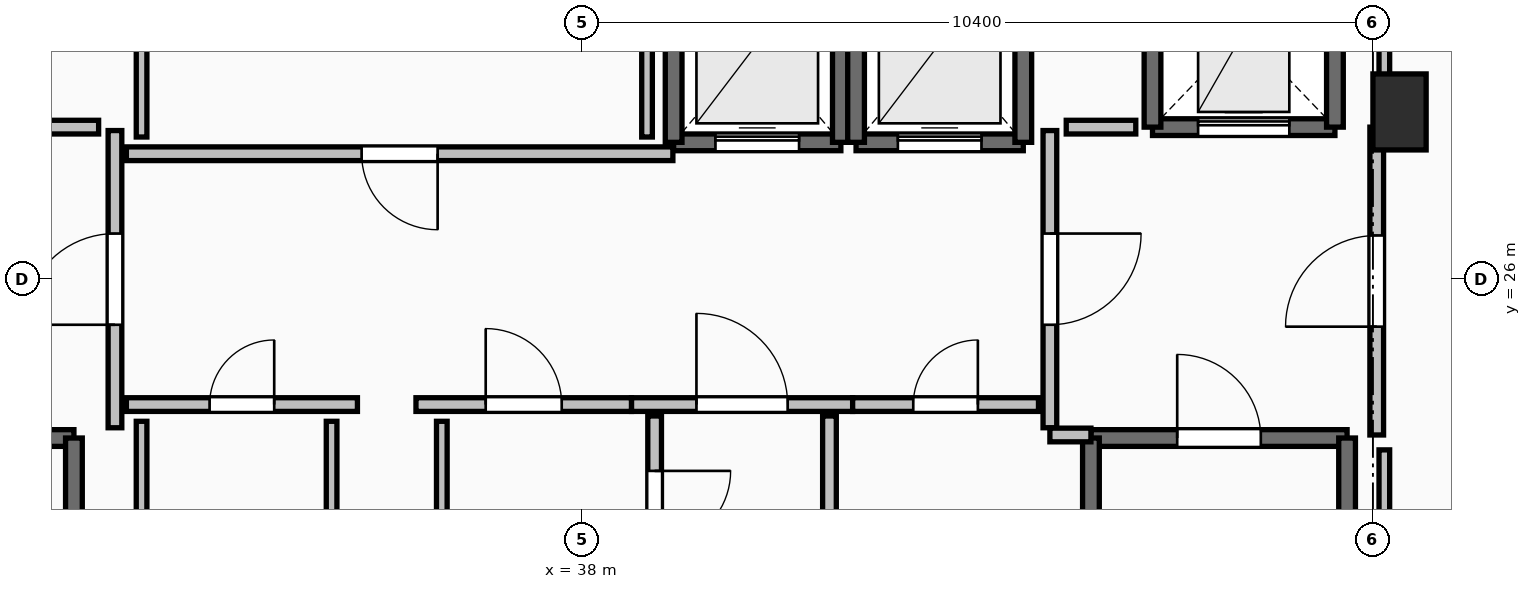
"""IFC4 building model, lengths in metres.
Left out: names, types, materials, properties, quantities, classifications, styles, units other than length and angle.
Written with IfcOpenShell. Run it as: python <this file> out.ifc"""

import sys

from ifc_helpers import new_model, si_unit, direction, frame, frame_2d, origin, origin_2d, place, context, subcontext, project, spatial, rectangle, extrude, element, fill, save


model = new_model("IFC4")
c1 = context("Model", 3, precision=1e-05, world=origin(), true_north=direction((0.0, 1.0)))
c2 = subcontext(c1, "Body", "Model", "MODEL_VIEW")
j1 = project(units=[si_unit("LENGTHUNIT", "METRE"), si_unit("PLANEANGLEUNIT", "RADIAN")], contexts=[c1])
p1 = place(None, origin())
s1 = spatial("IfcSite", under=j1, at=p1, CompositionType="ELEMENT")
p2 = place(p1, origin())
s2 = spatial("IfcBuilding", under=s1, at=p2, CompositionType="ELEMENT")
p3 = place(p2, frame((0.0, 0.0, 252.0)))
s3 = spatial("IfcBuildingStorey", under=s2, at=p3, CompositionType="ELEMENT", Elevation=252.0)
p4 = place(p3, frame((48.75, 28.2, 0.0), z_axis=(0.0, 0.0, 1.0), x_axis=(1.0, 0.0, 0.0)))
e1 = element("IfcColumn", 1, at=p4, inside=s3, PredefinedType="PILASTER", context=c2, shape_type="SweptSolid", body=[
    extrude(rectangle(XDim=0.7, YDim=1.0, at=origin_2d()), origin(), (0.0, 0.0, 1.0), 3.55),
])
p5 = place(p3, frame((27.94, 23.91, 0.0), z_axis=(0.0, 0.0, 1.0), x_axis=(1.0, 0.0, 0.0)))
e2 = element("IfcWall", 2, at=p5, inside=s3, PredefinedType="SOLIDWALL", context=c2, shape_type="SweptSolid", body=[
    extrude(rectangle(XDim=3.37, YDim=0.22, at=frame_2d((1.685, 0.0))), origin(), (0.0, 0.0, 1.0), 3.29),
])
p6 = place(p5, frame((1.135, 0.0, 0.0)))
e3 = element("IfcOpeningElement", 3, at=p6, cuts=e2, PredefinedType="OPENING", context=c2, shape_type="SweptSolid", body=[
    extrude(rectangle(XDim=1.1, YDim=2.15, at=frame_2d((0.55, 1.075))), frame((0.0, 0.125, 0.0), z_axis=(0.0, -1.0, 0.0), x_axis=(1.0, 0.0, 0.0)), (0.0, 0.0, 1.0), 0.25),
])
p7 = place(p3, frame((31.31, 23.91, 0.0), z_axis=(0.0, 0.0, 1.0), x_axis=(0.0, -1.0, 0.0)))
e4 = element("IfcWall", 4, at=p7, inside=s3, PredefinedType="SOLIDWALL", context=c2, shape_type="SweptSolid", body=[
    extrude(rectangle(XDim=7.42, YDim=0.22, at=frame_2d((3.71, 0.0))), origin(), (0.0, 0.0, 1.0), 3.29),
])
p8 = place(p3, frame((44.69, 23.91, 0.0), z_axis=(0.0, 0.0, 1.0), x_axis=(1.0, 0.0, 0.0)))
e5 = element("IfcWall", 5, at=p8, inside=s3, PredefinedType="SOLIDWALL", context=c2, shape_type="SweptSolid", body=[
    extrude(rectangle(XDim=3.37, YDim=0.22, at=frame_2d((1.685, 0.0))), origin(), (0.0, 0.0, 1.0), 3.29),
])
p9 = place(p8, frame((1.135, 0.0, 0.0)))
e6 = element("IfcOpeningElement", 6, at=p9, cuts=e5, PredefinedType="OPENING", context=c2, shape_type="SweptSolid", body=[
    extrude(rectangle(XDim=1.1, YDim=2.15, at=frame_2d((0.55, 1.075))), frame((0.0, 0.125, 0.0), z_axis=(0.0, -1.0, 0.0), x_axis=(1.0, 0.0, 0.0)), (0.0, 0.0, 1.0), 0.25),
])
for number, where, z_axis, x_axis in (
    (7, (48.06, 23.91, 0.0), (0.0, 0.0, 1.0), (0.0, -1.0, 0.0)),
    (8, (44.69, 16.49, 0.0), (0.0, 0.0, 1.0), (0.0, 1.0, 0.0)),
):
    element("IfcWall", number, at=place(p3, frame(where, z_axis=z_axis, x_axis=x_axis)), inside=s3, PredefinedType="SOLIDWALL", context=c2, shape_type="SweptSolid", body=[
        extrude(rectangle(XDim=7.42, YDim=0.22, at=frame_2d((3.71, 0.0))), origin(), (0.0, 0.0, 1.0), 3.29),
    ])
p10 = place(p3, frame((39.2, 27.8, 0.0), z_axis=(0.0, 0.0, 1.0), x_axis=(1.0, 0.0, 0.0)))
e9 = element("IfcWall", 9, at=p10, inside=s3, PredefinedType="SOLIDWALL", context=c2, shape_type="SweptSolid", body=[
    extrude(rectangle(XDim=2.2, YDim=0.22, at=frame_2d((1.1, 0.0))), origin(), (0.0, 0.0, 1.0), 3.29),
])
p11 = place(p10, frame((0.55, 0.0, 0.0)))
e10 = element("IfcOpeningElement", 10, at=p11, cuts=e9, PredefinedType="OPENING", context=c2, shape_type="SweptSolid", body=[
    extrude(rectangle(XDim=1.1, YDim=2.2, at=frame_2d((0.55, 1.1))), frame((0.0, 0.125, 0.0), z_axis=(0.0, -1.0, 0.0), x_axis=(1.0, 0.0, 0.0)), (0.0, 0.0, 1.0), 0.25),
])
for number, where, z_axis, x_axis in (
    (11, (41.4, 27.8, 0.0), (0.0, 0.0, 1.0), (0.0, 1.0, 0.0)),
    (12, (39.2, 30.4, 0.0), (0.0, 0.0, 1.0), (0.0, -1.0, 0.0)),
):
    element("IfcWall", number, at=place(p3, frame(where, z_axis=z_axis, x_axis=x_axis)), inside=s3, PredefinedType="SOLIDWALL", context=c2, shape_type="SweptSolid", body=[
        extrude(rectangle(XDim=2.6, YDim=0.22, at=frame_2d((1.3, 0.0))), origin(), (0.0, 0.0, 1.0), 3.29),
    ])
p12 = place(p3, frame((41.6, 27.8, 0.0), z_axis=(0.0, 0.0, 1.0), x_axis=(1.0, 0.0, 0.0)))
e13 = element("IfcWall", 13, at=p12, inside=s3, PredefinedType="SOLIDWALL", context=c2, shape_type="SweptSolid", body=[
    extrude(rectangle(XDim=2.2, YDim=0.22, at=frame_2d((1.1, 0.0))), origin(), (0.0, 0.0, 1.0), 3.29),
])
p13 = place(p12, frame((0.55, 0.0, 0.0)))
e14 = element("IfcOpeningElement", 14, at=p13, cuts=e13, PredefinedType="OPENING", context=c2, shape_type="SweptSolid", body=[
    extrude(rectangle(XDim=1.1, YDim=2.2, at=frame_2d((0.55, 1.1))), frame((0.0, 0.125, 0.0), z_axis=(0.0, -1.0, 0.0), x_axis=(1.0, 0.0, 0.0)), (0.0, 0.0, 1.0), 0.25),
])
for number, where, z_axis, x_axis in (
    (15, (43.8, 27.8, 0.0), (0.0, 0.0, 1.0), (0.0, 1.0, 0.0)),
    (16, (41.6, 30.4, 0.0), (0.0, 0.0, 1.0), (0.0, -1.0, 0.0)),
):
    element("IfcWall", number, at=place(p3, frame(where, z_axis=z_axis, x_axis=x_axis)), inside=s3, PredefinedType="SOLIDWALL", context=c2, shape_type="SweptSolid", body=[
        extrude(rectangle(XDim=2.6, YDim=0.22, at=frame_2d((1.3, 0.0))), origin(), (0.0, 0.0, 1.0), 3.29),
    ])
p14 = place(p3, frame((45.5, 28.0, 0.0), z_axis=(0.0, 0.0, 1.0), x_axis=(1.0, 0.0, 0.0)))
e17 = element("IfcWall", 17, at=p14, inside=s3, PredefinedType="SHEAR", context=c2, shape_type="SweptSolid", body=[
    extrude(rectangle(XDim=2.4, YDim=0.22, at=frame_2d((1.2, 0.0))), origin(), (0.0, 0.0, 1.0), 3.29),
])
p15 = place(p14, frame((0.6, 0.0, 0.0)))
e18 = element("IfcOpeningElement", 18, at=p15, cuts=e17, PredefinedType="OPENING", context=c2, shape_type="SweptSolid", body=[
    extrude(rectangle(XDim=1.2, YDim=2.2, at=frame_2d((0.6, 1.1))), frame((0.0, 0.125, 0.0), z_axis=(0.0, -1.0, 0.0), x_axis=(1.0, 0.0, 0.0)), (0.0, 0.0, 1.0), 0.25),
])
for number, where, z_axis, x_axis in (
    (19, (47.9, 28.0, 0.0), (0.0, 0.0, 1.0), (0.0, 1.0, 0.0)),
    (20, (45.5, 30.5, 0.0), (0.0, 0.0, 1.0), (0.0, -1.0, 0.0)),
):
    element("IfcWall", number, at=place(p3, frame(where, z_axis=z_axis, x_axis=x_axis)), inside=s3, PredefinedType="SHEAR", context=c2, shape_type="SweptSolid", body=[
        extrude(rectangle(XDim=2.5, YDim=0.22, at=frame_2d((1.25, 0.0))), origin(), (0.0, 0.0, 1.0), 3.29),
    ])
p16 = place(p3, frame((31.85, 24.045, 0.0), z_axis=(0.0, 0.0, 1.0), x_axis=(0.0, 1.0, 0.0)))
e21 = element("IfcWall", 21, at=p16, inside=s3, PredefinedType="PARTITIONING", context=c2, shape_type="SweptSolid", body=[
    extrude(rectangle(XDim=3.91, YDim=0.18, at=frame_2d((1.955, 0.0))), origin(), (0.0, 0.0, 1.0), 3.29),
])
p17 = place(p16, frame((1.355, 0.0, 0.0)))
e22 = element("IfcOpeningElement", 22, at=p17, cuts=e21, PredefinedType="OPENING", context=c2, shape_type="SweptSolid", body=[
    extrude(rectangle(XDim=1.2, YDim=2.15, at=frame_2d((0.6, 1.075))), frame((0.0, 0.105, 0.0), z_axis=(0.0, -1.0, 0.0), x_axis=(1.0, 0.0, 0.0)), (0.0, 0.0, 1.0), 0.21),
])
p18 = place(p3, frame((44.15, 27.955, 0.0), z_axis=(0.0, 0.0, 1.0), x_axis=(0.0, -1.0, 0.0)))
e23 = element("IfcWall", 23, at=p18, inside=s3, PredefinedType="PARTITIONING", context=c2, shape_type="SweptSolid", body=[
    extrude(rectangle(XDim=3.91, YDim=0.18, at=frame_2d((1.955, 0.0))), origin(), (0.0, 0.0, 1.0), 3.29),
])
p19 = place(p18, frame((1.355, 0.0, 0.0)))
e24 = element("IfcOpeningElement", 24, at=p19, cuts=e23, PredefinedType="OPENING", context=c2, shape_type="SweptSolid", body=[
    extrude(rectangle(XDim=1.2, YDim=2.15, at=frame_2d((0.6, 1.075))), frame((0.0, 0.105, 0.0), z_axis=(0.0, -1.0, 0.0), x_axis=(1.0, 0.0, 0.0)), (0.0, 0.0, 1.0), 0.21),
])
p20 = place(p3, frame((44.15, 23.95, 0.0), z_axis=(0.0, 0.0, 1.0), x_axis=(1.0, 0.0, 0.0)))
e25 = element("IfcWall", 25, at=p20, inside=s3, PredefinedType="PARTITIONING", context=c2, shape_type="SweptSolid", body=[
    extrude(rectangle(XDim=0.54, YDim=0.18, at=frame_2d((0.27, 0.0))), origin(), (0.0, 0.0, 1.0), 3.29),
])
p21 = place(p3, frame((48.45, 23.95, 0.0), z_axis=(0.0, 0.0, 1.0), x_axis=(0.0, 1.0, 0.0)))
e26 = element("IfcWall", 26, at=p21, inside=s3, PredefinedType="PARTITIONING", context=c2, shape_type="SweptSolid", body=[
    extrude(rectangle(XDim=4.05, YDim=0.18, at=frame_2d((2.025, 0.0))), origin(), (0.0, 0.0, 1.0), 3.29),
])
p22 = place(p21, frame((1.425, 0.0, 0.0)))
e27 = element("IfcOpeningElement", 27, at=p22, cuts=e26, PredefinedType="OPENING", context=c2, shape_type="SweptSolid", body=[
    extrude(rectangle(XDim=1.2, YDim=2.15, at=frame_2d((0.6, 1.075))), frame((0.0, 0.105, 0.0), z_axis=(0.0, -1.0, 0.0), x_axis=(1.0, 0.0, 0.0)), (0.0, 0.0, 1.0), 0.21),
])
p23 = place(p3, frame((38.645, 24.35, 0.0), z_axis=(0.0, 0.0, 1.0), x_axis=(1.0, 0.0, 0.0)))
e28 = element("IfcWall", 28, at=p23, inside=s3, PredefinedType="PARTITIONING", context=c2, shape_type="SweptSolid", body=[
    extrude(rectangle(XDim=2.91, YDim=0.18, at=frame_2d((1.455, 0.0))), origin(), (0.0, 0.0, 1.0), 3.29),
])
p24 = place(p23, frame((0.855, 0.0, 0.0)))
e29 = element("IfcOpeningElement", 29, at=p24, cuts=e28, PredefinedType="OPENING", context=c2, shape_type="SweptSolid", body=[
    extrude(rectangle(XDim=1.2, YDim=2.15, at=frame_2d((0.6, 1.075))), frame((0.0, 0.105, 0.0), z_axis=(0.0, -1.0, 0.0), x_axis=(1.0, 0.0, 0.0)), (0.0, 0.0, 1.0), 0.21),
])
p25 = place(p3, frame((41.555, 24.35, 0.0), z_axis=(0.0, 0.0, 1.0), x_axis=(1.0, 0.0, 0.0)))
e30 = element("IfcWall", 30, at=p25, inside=s3, PredefinedType="PARTITIONING", context=c2, shape_type="SweptSolid", body=[
    extrude(rectangle(XDim=2.445, YDim=0.18, at=frame_2d((1.223, 0.0))), origin(), (0.0, 0.0, 1.0), 3.29),
])
p26 = place(p25, frame((0.798, 0.0, 0.0)))
e31 = element("IfcOpeningElement", 31, at=p26, cuts=e30, PredefinedType="OPENING", context=c2, shape_type="SweptSolid", body=[
    extrude(rectangle(XDim=0.85, YDim=2.1, at=frame_2d((0.425, 1.05))), frame((0.0, 0.105, 0.0), z_axis=(0.0, -1.0, 0.0), x_axis=(1.0, 0.0, 0.0)), (0.0, 0.0, 1.0), 0.21),
])
p27 = place(p3, frame((39.19, 27.65, 0.0), z_axis=(0.0, 0.0, 1.0), x_axis=(-1.0, 0.0, 0.0)))
e32 = element("IfcWall", 32, at=p27, inside=s3, PredefinedType="PARTITIONING", context=c2, shape_type="SweptSolid", body=[
    extrude(rectangle(XDim=7.19, YDim=0.18, at=frame_2d((3.595, 0.0))), origin(), (0.0, 0.0, 1.0), 3.29),
])
p28 = place(p27, frame((3.095, 0.0, 0.0)))
e33 = element("IfcOpeningElement", 33, at=p28, cuts=e32, PredefinedType="OPENING", context=c2, shape_type="SweptSolid", body=[
    extrude(rectangle(XDim=1.0, YDim=2.15, at=frame_2d((0.5, 1.075))), frame((0.0, 0.105, 0.0), z_axis=(0.0, -1.0, 0.0), x_axis=(1.0, 0.0, 0.0)), (0.0, 0.0, 1.0), 0.21),
])
p29 = place(p3, frame((32.0, 24.35, 0.0), z_axis=(0.0, 0.0, 1.0), x_axis=(1.0, 0.0, 0.0)))
e34 = element("IfcWall", 34, at=p29, inside=s3, PredefinedType="PARTITIONING", context=c2, shape_type="SweptSolid", body=[
    extrude(rectangle(XDim=3.04, YDim=0.18, at=frame_2d((1.52, 0.0))), origin(), (0.0, 0.0, 1.0), 3.29),
])
p30 = place(p29, frame((1.095, 0.0, 0.0)))
e35 = element("IfcOpeningElement", 35, at=p30, cuts=e34, PredefinedType="OPENING", context=c2, shape_type="SweptSolid", body=[
    extrude(rectangle(XDim=0.85, YDim=2.1, at=frame_2d((0.425, 1.05))), frame((0.0, 0.105, 0.0), z_axis=(0.0, -1.0, 0.0), x_axis=(1.0, 0.0, 0.0)), (0.0, 0.0, 1.0), 0.21),
])
p31 = place(p3, frame((35.81, 24.35, 0.0), z_axis=(0.0, 0.0, 1.0), x_axis=(1.0, 0.0, 0.0)))
e36 = element("IfcWall", 36, at=p31, inside=s3, PredefinedType="PARTITIONING", context=c2, shape_type="SweptSolid", body=[
    extrude(rectangle(XDim=2.835, YDim=0.18, at=frame_2d((1.417, 0.0))), origin(), (0.0, 0.0, 1.0), 3.29),
])
p32 = place(p31, frame((0.917, 0.0, 0.0)))
e37 = element("IfcOpeningElement", 37, at=p32, cuts=e36, PredefinedType="OPENING", context=c2, shape_type="SweptSolid", body=[
    extrude(rectangle(XDim=1.0, YDim=2.15, at=frame_2d((0.5, 1.075))), frame((0.0, 0.105, 0.0), z_axis=(0.0, -1.0, 0.0), x_axis=(1.0, 0.0, 0.0)), (0.0, 0.0, 1.0), 0.21),
])
p33 = place(p3, frame((41.25, 20.305, 0.0), z_axis=(0.0, 0.0, 1.0), x_axis=(0.0, 1.0, 0.0)))
e38 = element("IfcWall", 38, at=p33, inside=s3, PredefinedType="PARTITIONING", context=c2, shape_type="SweptSolid", body=[
    extrude(rectangle(XDim=3.895, YDim=0.18, at=frame_2d((1.948, 0.0))), origin(), (0.0, 0.0, 1.0), 2.482),
])
p34 = place(p33, frame((1.522, 0.0, 0.0)))
e39 = element("IfcOpeningElement", 39, at=p34, cuts=e38, PredefinedType="OPENING", context=c2, shape_type="SweptSolid", body=[
    extrude(rectangle(XDim=0.85, YDim=2.1, at=frame_2d((0.425, 1.05))), frame((0.0, 0.105, 0.0), z_axis=(0.0, -1.0, 0.0), x_axis=(1.0, 0.0, 0.0)), (0.0, 0.0, 1.0), 0.21),
])
p35 = place(p3, frame((38.95, 24.2, 0.0), z_axis=(0.0, 0.0, 1.0), x_axis=(0.0, -1.0, 0.0)))
e40 = element("IfcWall", 40, at=p35, inside=s3, PredefinedType="PARTITIONING", context=c2, shape_type="SweptSolid", body=[
    extrude(rectangle(XDim=2.445, YDim=0.18, at=frame_2d((1.223, 0.0))), origin(), (0.0, 0.0, 1.0), 2.482),
])
p36 = place(p35, frame((0.722, 0.0, 0.0)))
e41 = element("IfcOpeningElement", 41, at=p36, cuts=e40, PredefinedType="OPENING", context=c2, shape_type="SweptSolid", body=[
    extrude(rectangle(XDim=1.0, YDim=2.15, at=frame_2d((0.5, 1.075))), frame((0.0, 0.105, 0.0), z_axis=(0.0, -1.0, 0.0), x_axis=(1.0, 0.0, 0.0)), (0.0, 0.0, 1.0), 0.21),
])
for number, where, z_axis, x_axis in (
    (42, (31.635, 28.0, 0.0), (0.0, 0.0, 1.0), (-1.0, 0.0, 0.0)),
    (43, (45.28, 28.0, 0.0), (0.0, 0.0, 1.0), (-1.0, 0.0, 0.0)),
):
    element("IfcWall", number, at=place(p3, frame(where, z_axis=z_axis, x_axis=x_axis)), inside=s3, PredefinedType="PARTITIONING", context=c2, shape_type="SweptSolid", body=[
        extrude(rectangle(XDim=0.915, YDim=0.18, at=frame_2d((0.458, 0.0))), origin(), (0.0, 0.0, 1.0), 3.29),
    ])
for number, where, z_axis, x_axis in (
    (44, (32.2, 30.26, 0.0), (0.0, 0.0, 1.0), (0.0, -1.0, 0.0)),
    (45, (38.85, 27.87, 0.0), (0.0, 0.0, 1.0), (0.0, 1.0, 0.0)),
):
    element("IfcWall", number, at=place(p3, frame(where, z_axis=z_axis, x_axis=x_axis)), inside=s3, PredefinedType="PARTITIONING", context=c2, shape_type="SweptSolid", body=[
        extrude(rectangle(XDim=2.39, YDim=0.14, at=frame_2d((1.195, 0.0))), origin(), (0.0, 0.0, 1.0), 3.29),
    ])
for number, where, z_axis, x_axis in (
    (46, (32.2, 24.13, 0.0), (0.0, 0.0, 1.0), (0.0, -1.0, 0.0)),
    (47, (34.7, 21.67, 0.0), (0.0, 0.0, 1.0), (0.0, 1.0, 0.0)),
    (48, (36.15, 24.13, 0.0), (0.0, 0.0, 1.0), (0.0, -1.0, 0.0)),
):
    element("IfcWall", number, at=place(p3, frame(where, z_axis=z_axis, x_axis=x_axis)), inside=s3, PredefinedType="PARTITIONING", context=c2, shape_type="SweptSolid", body=[
        extrude(rectangle(XDim=2.46, YDim=0.14, at=frame_2d((1.23, 0.0))), origin(), (0.0, 0.0, 1.0), 2.482),
    ])
p37 = place(p3, frame((48.55, 16.24, 0.0), z_axis=(0.0, 0.0, 1.0), x_axis=(0.0, 1.0, 0.0)))
e49 = element("IfcWall", 49, at=p37, inside=s3, PredefinedType="PARTITIONING", context=c2, shape_type="SweptSolid", body=[
    extrude(rectangle(XDim=7.514, YDim=0.14, at=frame_2d((3.757, 0.0))), origin(), (0.0, 0.0, 1.0), 2.482),
])
p38 = place(p3, frame((48.55, 28.196, 0.0), z_axis=(0.0, 0.0, 1.0), x_axis=(0.0, 1.0, 0.0)))
e50 = element("IfcWall", 50, at=p38, inside=s3, PredefinedType="PARTITIONING", context=c2, shape_type="SweptSolid", body=[
    extrude(rectangle(XDim=5.254, YDim=0.14, at=frame_2d((2.627, 0.0))), origin(), (0.0, 0.0, 1.0), 2.482),
])
p39 = place(p9, origin())
e51 = element("IfcDoor", 51, at=p39, inside=s3, OperationType="SINGLE_SWING_LEFT", PredefinedType="DOOR", context=c2, shape_type="SweptSolid", body=[
    extrude(rectangle(XDim=1.1, YDim=2.15, at=frame_2d((0.55, 1.075))), frame((0.0, 0.025, 0.0), z_axis=(0.0, -1.0, 0.0), x_axis=(1.0, 0.0, 0.0)), (0.0, 0.0, 1.0), 0.05),
])
fill(e6, e51)
p40 = place(p11, origin())
e52 = element("IfcDoor", 52, at=p40, inside=s3, OperationType="SLIDING_TO_LEFT", PredefinedType="DOOR", context=c2, shape_type="SweptSolid", body=[
    extrude(rectangle(XDim=1.1, YDim=2.2, at=frame_2d((0.55, 1.1))), frame((0.0, 0.025, 0.0), z_axis=(0.0, -1.0, 0.0), x_axis=(1.0, 0.0, 0.0)), (0.0, 0.0, 1.0), 0.05),
])
fill(e10, e52)
p41 = place(p13, origin())
e53 = element("IfcDoor", 53, at=p41, inside=s3, OperationType="SLIDING_TO_LEFT", PredefinedType="DOOR", context=c2, shape_type="SweptSolid", body=[
    extrude(rectangle(XDim=1.1, YDim=2.2, at=frame_2d((0.55, 1.1))), frame((0.0, 0.025, 0.0), z_axis=(0.0, -1.0, 0.0), x_axis=(1.0, 0.0, 0.0)), (0.0, 0.0, 1.0), 0.05),
])
fill(e14, e53)
p42 = place(p15, origin())
e54 = element("IfcDoor", 54, at=p42, inside=s3, OperationType="SLIDING_TO_LEFT", PredefinedType="DOOR", context=c2, shape_type="SweptSolid", body=[
    extrude(rectangle(XDim=1.2, YDim=2.2, at=frame_2d((0.6, 1.1))), frame((0.0, 0.025, 0.0), z_axis=(0.0, -1.0, 0.0), x_axis=(1.0, 0.0, 0.0)), (0.0, 0.0, 1.0), 0.05),
])
fill(e18, e54)
p43 = place(p17, origin())
e55 = element("IfcDoor", 55, at=p43, inside=s3, OperationType="SINGLE_SWING_LEFT", PredefinedType="DOOR", context=c2, shape_type="SweptSolid", body=[
    extrude(rectangle(XDim=1.2, YDim=2.15, at=frame_2d((0.6, 1.075))), frame((0.0, 0.025, 0.0), z_axis=(0.0, -1.0, 0.0), x_axis=(1.0, 0.0, 0.0)), (0.0, 0.0, 1.0), 0.05),
])
fill(e22, e55)
p44 = place(p19, origin())
e56 = element("IfcDoor", 56, at=p44, inside=s3, OperationType="SINGLE_SWING_LEFT", PredefinedType="DOOR", context=c2, shape_type="SweptSolid", body=[
    extrude(rectangle(XDim=1.2, YDim=2.15, at=frame_2d((0.6, 1.075))), frame((0.0, 0.025, 0.0), z_axis=(0.0, -1.0, 0.0), x_axis=(1.0, 0.0, 0.0)), (0.0, 0.0, 1.0), 0.05),
])
fill(e24, e56)
p45 = place(p22, origin())
e57 = element("IfcDoor", 57, at=p45, inside=s3, OperationType="SINGLE_SWING_LEFT", PredefinedType="DOOR", context=c2, shape_type="SweptSolid", body=[
    extrude(rectangle(XDim=1.2, YDim=2.15, at=frame_2d((0.6, 1.075))), frame((0.0, 0.025, 0.0), z_axis=(0.0, -1.0, 0.0), x_axis=(1.0, 0.0, 0.0)), (0.0, 0.0, 1.0), 0.05),
])
fill(e27, e57)
p46 = place(p24, origin())
e58 = element("IfcDoor", 58, at=p46, inside=s3, OperationType="SINGLE_SWING_LEFT", PredefinedType="DOOR", context=c2, shape_type="SweptSolid", body=[
    extrude(rectangle(XDim=1.2, YDim=2.15, at=frame_2d((0.6, 1.075))), frame((0.0, 0.025, 0.0), z_axis=(0.0, -1.0, 0.0), x_axis=(1.0, 0.0, 0.0)), (0.0, 0.0, 1.0), 0.05),
])
fill(e29, e58)
p47 = place(p26, origin())
e59 = element("IfcDoor", 59, at=p47, inside=s3, OperationType="SINGLE_SWING_RIGHT", PredefinedType="DOOR", context=c2, shape_type="SweptSolid", body=[
    extrude(rectangle(XDim=0.85, YDim=2.1, at=frame_2d((0.425, 1.05))), frame((0.0, 0.025, 0.0), z_axis=(0.0, -1.0, 0.0), x_axis=(1.0, 0.0, 0.0)), (0.0, 0.0, 1.0), 0.05),
])
fill(e31, e59)
p48 = place(p28, origin())
e60 = element("IfcDoor", 60, at=p48, inside=s3, OperationType="SINGLE_SWING_LEFT", PredefinedType="DOOR", context=c2, shape_type="SweptSolid", body=[
    extrude(rectangle(XDim=1.0, YDim=2.15, at=frame_2d((0.5, 1.075))), frame((0.0, 0.025, 0.0), z_axis=(0.0, -1.0, 0.0), x_axis=(1.0, 0.0, 0.0)), (0.0, 0.0, 1.0), 0.05),
])
fill(e33, e60)
p49 = place(p30, origin())
e61 = element("IfcDoor", 61, at=p49, inside=s3, OperationType="SINGLE_SWING_RIGHT", PredefinedType="DOOR", context=c2, shape_type="SweptSolid", body=[
    extrude(rectangle(XDim=0.85, YDim=2.1, at=frame_2d((0.425, 1.05))), frame((0.0, 0.025, 0.0), z_axis=(0.0, -1.0, 0.0), x_axis=(1.0, 0.0, 0.0)), (0.0, 0.0, 1.0), 0.05),
])
fill(e35, e61)
p50 = place(p32, origin())
e62 = element("IfcDoor", 62, at=p50, inside=s3, OperationType="SINGLE_SWING_LEFT", PredefinedType="DOOR", context=c2, shape_type="SweptSolid", body=[
    extrude(rectangle(XDim=1.0, YDim=2.15, at=frame_2d((0.5, 1.075))), frame((0.0, 0.025, 0.0), z_axis=(0.0, -1.0, 0.0), x_axis=(1.0, 0.0, 0.0)), (0.0, 0.0, 1.0), 0.05),
])
fill(e37, e62)
p51 = place(p36, origin())
e63 = element("IfcDoor", 63, at=p51, inside=s3, OperationType="SINGLE_SWING_LEFT", PredefinedType="DOOR", context=c2, shape_type="SweptSolid", body=[
    extrude(rectangle(XDim=1.0, YDim=2.15, at=frame_2d((0.5, 1.075))), frame((0.0, 0.025, 0.0), z_axis=(0.0, -1.0, 0.0), x_axis=(1.0, 0.0, 0.0)), (0.0, 0.0, 1.0), 0.05),
])
fill(e41, e63)
save(model, sys.argv[1])
